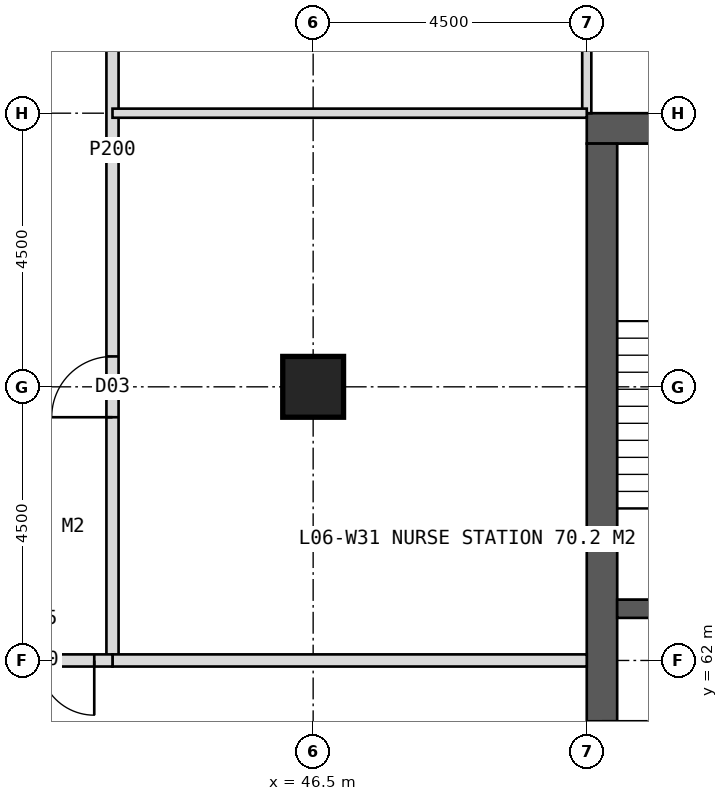
"""IFC4 building model, lengths in metres.
Left out: names, types, materials, properties, quantities, classifications, styles, units other than length and angle.
Written with IfcOpenShell. Run it as: python <this file> out.ifc"""

import sys

from ifc_helpers import new_model, si_unit, direction, frame, frame_2d, origin, origin_2d, place, context, subcontext, project, spatial, rectangle, hollow_rectangle, extrude, element, fill, save


model = new_model("IFC4")
c1 = context("Model", 3, precision=1e-05, world=origin(), true_north=direction((0.0, 1.0)))
c2 = subcontext(c1, "Body", "Model", "MODEL_VIEW")
j1 = project(units=[si_unit("LENGTHUNIT", "METRE"), si_unit("PLANEANGLEUNIT", "RADIAN")], contexts=[c1])
p1 = place(None, origin())
s1 = spatial("IfcSite", under=j1, at=p1, CompositionType="ELEMENT")
p2 = place(p1, origin())
s2 = spatial("IfcBuilding", under=s1, at=p2, CompositionType="ELEMENT")
p3 = place(p2, frame((0.0, 0.0, 31.0)))
s3 = spatial("IfcBuildingStorey", under=s2, at=p3, CompositionType="ELEMENT", Elevation=31.0)
p4 = place(p3, frame((51.0, 70.75, 0.0), z_axis=(0.0, 0.0, 1.0), x_axis=(1.0, 0.0, 0.0)))
e1 = element("IfcWall", 1, at=p4, inside=s3, PredefinedType="SHEAR", context=c2, shape_type="SweptSolid", body=[
    extrude(rectangle(XDim=18.0, YDim=0.5, at=frame_2d((9.0, 0.0))), origin(), (0.0, 0.0, 1.0), 4.0),
])
p5 = place(p4, frame((8.1, 0.0, 0.0)))
e2 = element("IfcOpeningElement", 2, at=p5, cuts=e1, PredefinedType="OPENING", context=c2, shape_type="SweptSolid", body=[
    extrude(rectangle(XDim=1.8, YDim=2.2, at=frame_2d((0.9, 1.1))), frame((0.0, 0.26, 0.0), z_axis=(0.0, -1.0, 0.0), x_axis=(1.0, 0.0, 0.0)), (0.0, 0.0, 1.0), 0.52),
])
p6 = place(p3, frame((51.25, 53.5, 0.0), z_axis=(0.0, 0.0, 1.0), x_axis=(0.0, 1.0, 0.0)))
e3 = element("IfcWall", 3, at=p6, inside=s3, PredefinedType="SHEAR", context=c2, shape_type="SweptSolid", body=[
    extrude(rectangle(XDim=17.0, YDim=0.5, at=frame_2d((8.5, 0.0))), origin(), (0.0, 0.0, 1.0), 4.0),
])
p7 = place(p6, frame((6.0, 0.0, 0.0)))
e4 = element("IfcOpeningElement", 4, at=p7, cuts=e3, PredefinedType="OPENING", context=c2, shape_type="SweptSolid", body=[
    extrude(rectangle(XDim=1.5, YDim=2.2, at=frame_2d((0.75, 1.1))), frame((0.0, 0.26, 0.0), z_axis=(0.0, -1.0, 0.0), x_axis=(1.0, 0.0, 0.0)), (0.0, 0.0, 1.0), 0.52),
])
p8 = place(p3, frame((51.5, 62.85, 0.0), z_axis=(0.0, 0.0, 1.0), x_axis=(1.0, 0.0, 0.0)))
e5 = element("IfcWall", 5, at=p8, inside=s3, PredefinedType="SHEAR", context=c2, shape_type="SweptSolid", body=[
    extrude(rectangle(XDim=3.3, YDim=0.3, at=frame_2d((1.65, 0.0))), origin(), (0.0, 0.0, 1.0), 4.0),
])
p9 = place(p8, frame((1.05, 0.0, 0.0)))
e6 = element("IfcOpeningElement", 6, at=p9, cuts=e5, PredefinedType="OPENING", context=c2, shape_type="SweptSolid", body=[
    extrude(rectangle(XDim=1.2, YDim=2.1, at=frame_2d((0.6, 1.05))), frame((0.0, 0.16, 0.0), z_axis=(0.0, -1.0, 0.0), x_axis=(1.0, 0.0, 0.0)), (0.0, 0.0, 1.0), 0.32),
])
p10 = place(p3, frame((46.5, 66.5, 0.0), z_axis=(0.0, 0.0, 1.0), x_axis=(1.0, 0.0, 0.0)))
e7 = element("IfcColumn", 7, at=p10, inside=s3, PredefinedType="COLUMN", context=c2, shape_type="SweptSolid", body=[
    extrude(hollow_rectangle(XDim=1.0, YDim=1.0, WallThickness=0.1, at=origin_2d()), origin(), (0.0, 0.0, 1.0), 4.0),
])
p11 = place(p3, frame((51.0, 71.0, 0.0), z_axis=(0.0, 0.0, 1.0), x_axis=(0.0, 1.0, 0.0)))
e8 = element("IfcWall", 8, at=p11, inside=s3, PredefinedType="PARTITIONING", context=c2, shape_type="SweptSolid", body=[
    extrude(rectangle(XDim=7.8, YDim=0.15, at=frame_2d((3.9, 0.0))), origin(), (0.0, 0.0, 1.0), 3.75),
])
p12 = place(p3, frame((43.2, 62.0, 0.0), z_axis=(0.0, 0.0, 1.0), x_axis=(0.0, 1.0, 0.0)))
e9 = element("IfcWall", 9, at=p12, inside=s3, PredefinedType="PARTITIONING", context=c2, shape_type="SweptSolid", body=[
    extrude(rectangle(XDim=16.8, YDim=0.2, at=frame_2d((8.4, 0.0))), origin(), (0.0, 0.0, 1.0), 3.75),
])
p13 = place(p12, frame((4.0, 0.0, 0.0)))
e10 = element("IfcOpeningElement", 10, at=p13, cuts=e9, PredefinedType="OPENING", context=c2, shape_type="SweptSolid", body=[
    extrude(rectangle(XDim=1.0, YDim=2.1, at=frame_2d((0.5, 1.05))), frame((0.0, 0.11, 0.0), z_axis=(0.0, -1.0, 0.0), x_axis=(1.0, 0.0, 0.0)), (0.0, 0.0, 1.0), 0.22),
])
p14 = place(p12, frame((12.4, 0.0, 0.0)))
e11 = element("IfcOpeningElement", 11, at=p14, cuts=e9, PredefinedType="OPENING", context=c2, shape_type="SweptSolid", body=[
    extrude(rectangle(XDim=1.0, YDim=2.1, at=frame_2d((0.5, 1.05))), frame((0.0, 0.11, 0.0), z_axis=(0.0, -1.0, 0.0), x_axis=(1.0, 0.0, 0.0)), (0.0, 0.0, 1.0), 0.22),
])
p15 = place(p3, frame((51.0, 62.0, 0.0), z_axis=(0.0, 0.0, 1.0), x_axis=(-1.0, 0.0, 0.0)))
e12 = element("IfcWall", 12, at=p15, inside=s3, PredefinedType="SOLIDWALL", context=c2, shape_type="SweptSolid", body=[
    extrude(rectangle(XDim=7.8, YDim=0.2, at=frame_2d((3.9, 0.0))), origin(), (0.0, 0.0, 1.0), 2.75),
])
p16 = place(p3, frame((51.0, 71.0, 0.0), z_axis=(0.0, 0.0, 1.0), x_axis=(-1.0, 0.0, 0.0)))
e13 = element("IfcWall", 13, at=p16, inside=s3, PredefinedType="PARTITIONING", context=c2, shape_type="SweptSolid", body=[
    extrude(rectangle(XDim=7.8, YDim=0.15, at=frame_2d((3.9, 0.0))), origin(), (0.0, 0.0, 1.0), 3.75),
])
p17 = place(p3, frame((43.2, 62.0, 0.0), z_axis=(0.0, 0.0, 1.0), x_axis=(-1.0, 0.0, 0.0)))
e14 = element("IfcWall", 14, at=p17, inside=s3, PredefinedType="SOLIDWALL", context=c2, shape_type="SweptSolid", body=[
    extrude(rectangle(XDim=2.7, YDim=0.2, at=frame_2d((1.35, 0.0))), origin(), (0.0, 0.0, 1.0), 2.75),
])
p18 = place(p17, frame((0.3, 0.0, 0.0)))
e15 = element("IfcOpeningElement", 15, at=p18, cuts=e14, PredefinedType="OPENING", context=c2, shape_type="SweptSolid", body=[
    extrude(rectangle(XDim=1.8, YDim=2.2, at=frame_2d((0.9, 1.1))), frame((0.0, 0.11, 0.0), z_axis=(0.0, -1.0, 0.0), x_axis=(1.0, 0.0, 0.0)), (0.0, 0.0, 1.0), 0.22),
])
p19 = place(p13, origin())
e16 = element("IfcDoor", 16, at=p19, inside=s3, OperationType="SINGLE_SWING_LEFT", PredefinedType="DOOR", context=c2, shape_type="SweptSolid", body=[
    extrude(rectangle(XDim=1.0, YDim=2.1, at=frame_2d((0.5, 1.05))), frame((0.0, 0.025, 0.0), z_axis=(0.0, -1.0, 0.0), x_axis=(1.0, 0.0, 0.0)), (0.0, 0.0, 1.0), 0.05),
])
fill(e10, e16)
p20 = place(p18, origin())
e17 = element("IfcDoor", 17, at=p20, inside=s3, OperationType="DOUBLE_DOOR_DOUBLE_SWING", PredefinedType="DOOR", context=c2, shape_type="SweptSolid", body=[
    extrude(rectangle(XDim=1.8, YDim=2.2, at=frame_2d((0.9, 1.1))), frame((0.0, 0.025, 0.0), z_axis=(0.0, -1.0, 0.0), x_axis=(1.0, 0.0, 0.0)), (0.0, 0.0, 1.0), 0.05),
])
fill(e15, e17)
save(model, sys.argv[1])
